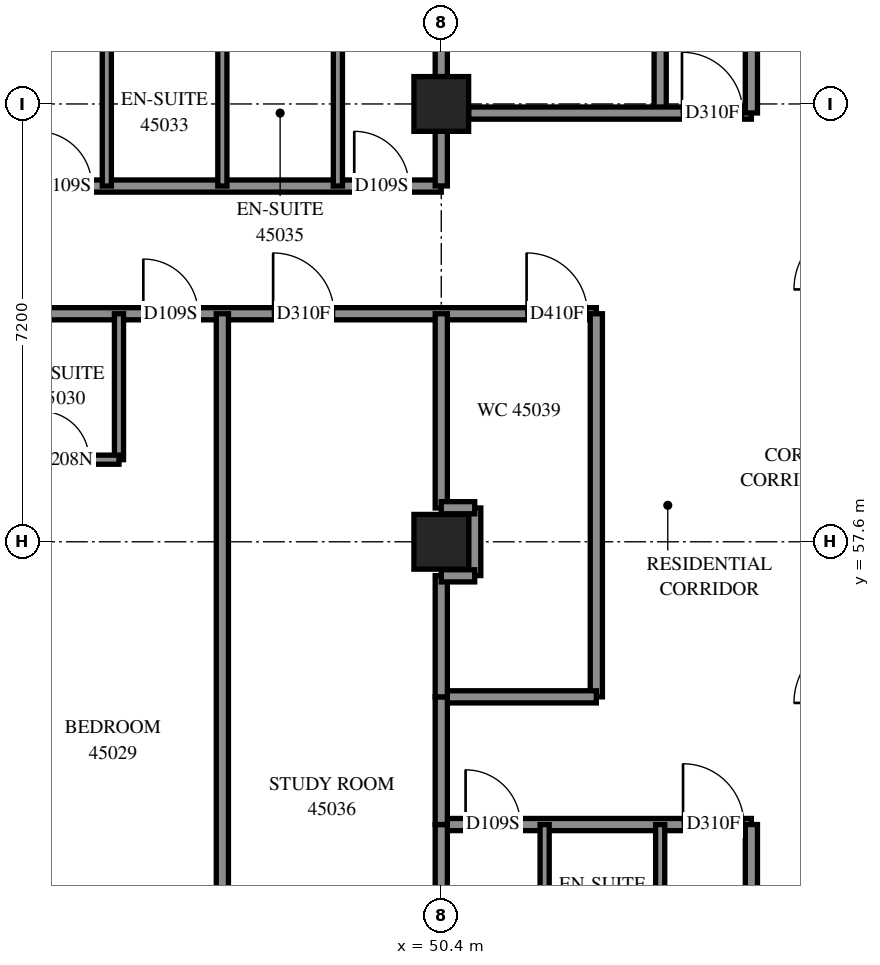
"""IFC4 building model, lengths in metres.
Left out: names, types, materials, properties, quantities, classifications, styles, units other than length and angle.
Written with IfcOpenShell. Run it as: python <this file> out.ifc"""

import sys

from ifc_helpers import new_model, si_unit, direction, frame, frame_2d, origin, origin_2d, place, context, subcontext, project, spatial, rectangle, extrude, element, fill, save


model = new_model("IFC4")
c1 = context("Model", 3, precision=1e-05, world=origin(), true_north=direction((0.0, 1.0)))
c2 = subcontext(c1, "Body", "Model", "MODEL_VIEW")
j1 = project(units=[si_unit("LENGTHUNIT", "METRE"), si_unit("PLANEANGLEUNIT", "RADIAN")], contexts=[c1])
p1 = place(None, origin())
s1 = spatial("IfcSite", under=j1, at=p1, CompositionType="ELEMENT")
p2 = place(p1, origin())
s2 = spatial("IfcBuilding", under=s1, at=p2, CompositionType="ELEMENT")
p3 = place(p2, frame((0.0, 0.0, 166.0)))
s3 = spatial("IfcBuildingStorey", under=s2, at=p3, CompositionType="ELEMENT", Elevation=166.0)
for number, where, z_axis, x_axis in (
    (1, (50.4, 57.6, 0.0), (0.0, 0.0, 1.0), (1.0, 0.0, 0.0)),
    (2, (50.4, 64.8, 0.0), (0.0, 0.0, 1.0), (1.0, 0.0, 0.0)),
):
    element("IfcColumn", number, at=place(p3, frame(where, z_axis=z_axis, x_axis=x_axis)), inside=s3, PredefinedType="COLUMN", context=c2, shape_type="SweptSolid", body=[
        extrude(rectangle(XDim=0.9, YDim=0.9, at=origin_2d()), origin(), (0.0, 0.0, 1.0), 3.1),
    ])
p4 = place(p3, frame((36.0, 61.35, 0.0), z_axis=(0.0, 0.0, 1.0), x_axis=(1.0, 0.0, 0.0)))
e3 = element("IfcWall", 3, at=p4, inside=s3, PredefinedType="PARTITIONING", context=c2, shape_type="SweptSolid", body=[
    extrude(rectangle(XDim=16.95, YDim=0.2, at=frame_2d((8.475, 0.0))), origin(), (0.0, 0.0, 1.0), 3.1),
])
p5 = place(p4, frame((2.3, 0.0, 0.0)))
e4 = element("IfcOpeningElement", 4, at=p5, cuts=e3, PredefinedType="OPENING", context=c2, shape_type="SweptSolid", body=[
    extrude(rectangle(XDim=0.9, YDim=2.1, at=frame_2d((0.45, 1.05))), frame((0.0, 0.11, 0.0), z_axis=(0.0, -1.0, 0.0), x_axis=(1.0, 0.0, 0.0)), (0.0, 0.0, 1.0), 0.22),
])
p6 = place(p4, frame((4.125, 0.0, 0.0)))
e5 = element("IfcOpeningElement", 5, at=p6, cuts=e3, PredefinedType="OPENING", context=c2, shape_type="SweptSolid", body=[
    extrude(rectangle(XDim=1.0, YDim=2.1, at=frame_2d((0.5, 1.05))), frame((0.0, 0.11, 0.0), z_axis=(0.0, -1.0, 0.0), x_axis=(1.0, 0.0, 0.0)), (0.0, 0.0, 1.0), 0.22),
])
p7 = place(p4, frame((9.5, 0.0, 0.0)))
e6 = element("IfcOpeningElement", 6, at=p7, cuts=e3, PredefinedType="OPENING", context=c2, shape_type="SweptSolid", body=[
    extrude(rectangle(XDim=0.9, YDim=2.1, at=frame_2d((0.45, 1.05))), frame((0.0, 0.11, 0.0), z_axis=(0.0, -1.0, 0.0), x_axis=(1.0, 0.0, 0.0)), (0.0, 0.0, 1.0), 0.22),
])
p8 = place(p4, frame((11.635, 0.0, 0.0)))
e7 = element("IfcOpeningElement", 7, at=p8, cuts=e3, PredefinedType="OPENING", context=c2, shape_type="SweptSolid", body=[
    extrude(rectangle(XDim=1.0, YDim=2.1, at=frame_2d((0.5, 1.05))), frame((0.0, 0.11, 0.0), z_axis=(0.0, -1.0, 0.0), x_axis=(1.0, 0.0, 0.0)), (0.0, 0.0, 1.0), 0.22),
])
p9 = place(p4, frame((15.803, 0.0, 0.0)))
e8 = element("IfcOpeningElement", 8, at=p9, cuts=e3, PredefinedType="OPENING", context=c2, shape_type="SweptSolid", body=[
    extrude(rectangle(XDim=1.0, YDim=2.1, at=frame_2d((0.5, 1.05))), frame((0.0, 0.11, 0.0), z_axis=(0.0, -1.0, 0.0), x_axis=(1.0, 0.0, 0.0)), (0.0, 0.0, 1.0), 0.22),
])
p10 = place(p3, frame((46.8, 49.7, 0.0), z_axis=(0.0, 0.0, 1.0), x_axis=(0.0, 1.0, 0.0)))
e9 = element("IfcWall", 9, at=p10, inside=s3, PredefinedType="PARTITIONING", context=c2, shape_type="SweptSolid", body=[
    extrude(rectangle(XDim=11.65, YDim=0.2, at=frame_2d((5.825, 0.0))), origin(), (0.0, 0.0, 1.0), 3.1),
])
p11 = place(p3, frame((40.65, 63.45, 0.0), z_axis=(0.0, 0.0, 1.0), x_axis=(1.0, 0.0, 0.0)))
e10 = element("IfcWall", 10, at=p11, inside=s3, PredefinedType="PARTITIONING", context=c2, shape_type="SweptSolid", body=[
    extrude(rectangle(XDim=9.75, YDim=0.2, at=frame_2d((4.875, 0.0))), origin(), (0.0, 0.0, 1.0), 3.1),
])
p12 = place(p11, frame((0.144, 0.0, 0.0)))
e11 = element("IfcOpeningElement", 11, at=p12, cuts=e10, PredefinedType="OPENING", context=c2, shape_type="SweptSolid", body=[
    extrude(rectangle(XDim=1.0, YDim=2.1, at=frame_2d((0.5, 1.05))), frame((0.0, 0.11, 0.0), z_axis=(0.0, -1.0, 0.0), x_axis=(1.0, 0.0, 0.0)), (0.0, 0.0, 1.0), 0.22),
])
p13 = place(p11, frame((3.102, 0.0, 0.0)))
e12 = element("IfcOpeningElement", 12, at=p13, cuts=e10, PredefinedType="OPENING", context=c2, shape_type="SweptSolid", body=[
    extrude(rectangle(XDim=0.9, YDim=2.1, at=frame_2d((0.45, 1.05))), frame((0.0, 0.11, 0.0), z_axis=(0.0, -1.0, 0.0), x_axis=(1.0, 0.0, 0.0)), (0.0, 0.0, 1.0), 0.22),
])
p14 = place(p11, frame((8.319, 0.0, 0.0)))
e13 = element("IfcOpeningElement", 13, at=p14, cuts=e10, PredefinedType="OPENING", context=c2, shape_type="SweptSolid", body=[
    extrude(rectangle(XDim=0.9, YDim=2.1, at=frame_2d((0.45, 1.05))), frame((0.0, 0.11, 0.0), z_axis=(0.0, -1.0, 0.0), x_axis=(1.0, 0.0, 0.0)), (0.0, 0.0, 1.0), 0.22),
])
p15 = place(p3, frame((54.0, 64.65, 0.0), z_axis=(0.0, 0.0, 1.0), x_axis=(0.0, 1.0, 0.0)))
e14 = element("IfcWall", 14, at=p15, inside=s3, PredefinedType="PARTITIONING", context=c2, shape_type="SweptSolid", body=[
    extrude(rectangle(XDim=8.117, YDim=0.2, at=frame_2d((4.059, 0.0))), origin(), (0.0, 0.0, 1.0), 3.1),
])
for number, where, z_axis, x_axis in (
    (15, (52.95, 55.05, 0.0), (0.0, 0.0, 1.0), (0.0, 1.0, 0.0)),
    (16, (50.4, 65.25, 0.0), (0.0, 0.0, 1.0), (0.0, 1.0, 0.0)),
):
    element("IfcWall", number, at=place(p3, frame(where, z_axis=z_axis, x_axis=x_axis)), inside=s3, PredefinedType="PARTITIONING", context=c2, shape_type="SweptSolid", body=[
        extrude(rectangle(XDim=6.3, YDim=0.2, at=frame_2d((3.15, 0.0))), origin(), (0.0, 0.0, 1.0), 3.1),
    ])
p16 = place(p3, frame((50.4, 52.95, 0.0), z_axis=(0.0, 0.0, 1.0), x_axis=(1.0, 0.0, 0.0)))
e17 = element("IfcWall", 17, at=p16, inside=s3, PredefinedType="PARTITIONING", context=c2, shape_type="SweptSolid", body=[
    extrude(rectangle(XDim=5.1, YDim=0.2, at=frame_2d((2.55, 0.0))), origin(), (0.0, 0.0, 1.0), 3.1),
])
p17 = place(p16, frame((0.4, 0.0, 0.0)))
e18 = element("IfcOpeningElement", 18, at=p17, cuts=e17, PredefinedType="OPENING", context=c2, shape_type="SweptSolid", body=[
    extrude(rectangle(XDim=0.9, YDim=2.1, at=frame_2d((0.45, 1.05))), frame((0.0, 0.11, 0.0), z_axis=(0.0, -1.0, 0.0), x_axis=(1.0, 0.0, 0.0)), (0.0, 0.0, 1.0), 0.22),
])
p18 = place(p16, frame((3.976, 0.0, 0.0)))
e19 = element("IfcOpeningElement", 19, at=p18, cuts=e17, PredefinedType="OPENING", context=c2, shape_type="SweptSolid", body=[
    extrude(rectangle(XDim=1.0, YDim=2.1, at=frame_2d((0.5, 1.05))), frame((0.0, 0.11, 0.0), z_axis=(0.0, -1.0, 0.0), x_axis=(1.0, 0.0, 0.0)), (0.0, 0.0, 1.0), 0.22),
])
p19 = place(p3, frame((55.5, 48.3, 0.0), z_axis=(0.0, 0.0, 1.0), x_axis=(0.0, 1.0, 0.0)))
e20 = element("IfcWall", 20, at=p19, inside=s3, PredefinedType="PARTITIONING", context=c2, shape_type="SweptSolid", body=[
    extrude(rectangle(XDim=4.65, YDim=0.2, at=frame_2d((2.325, 0.0))), origin(), (0.0, 0.0, 1.0), 3.1),
])
p20 = place(p3, frame((50.85, 64.65, 0.0), z_axis=(0.0, 0.0, 1.0), x_axis=(1.0, 0.0, 0.0)))
e21 = element("IfcWall", 21, at=p20, inside=s3, PredefinedType="PARTITIONING", context=c2, shape_type="SweptSolid", body=[
    extrude(rectangle(XDim=4.65, YDim=0.2, at=frame_2d((2.325, 0.0))), origin(), (0.0, 0.0, 1.0), 3.1),
])
p21 = place(p20, frame((3.509, 0.0, 0.0)))
e22 = element("IfcOpeningElement", 22, at=p21, cuts=e21, PredefinedType="OPENING", context=c2, shape_type="SweptSolid", body=[
    extrude(rectangle(XDim=1.0, YDim=2.1, at=frame_2d((0.5, 1.05))), frame((0.0, 0.11, 0.0), z_axis=(0.0, -1.0, 0.0), x_axis=(1.0, 0.0, 0.0)), (0.0, 0.0, 1.0), 0.22),
])
p22 = place(p3, frame((50.4, 58.156, 0.0), z_axis=(0.0, 0.0, 1.0), x_axis=(0.0, 1.0, 0.0)))
e23 = element("IfcWall", 23, at=p22, inside=s3, PredefinedType="PARTITIONING", context=c2, shape_type="SweptSolid", body=[
    extrude(rectangle(XDim=3.194, YDim=0.2, at=frame_2d((1.597, 0.0))), origin(), (0.0, 0.0, 1.0), 3.1),
])
p23 = place(p3, frame((50.4, 55.05, 0.0), z_axis=(0.0, 0.0, 1.0), x_axis=(1.0, 0.0, 0.0)))
e24 = element("IfcWall", 24, at=p23, inside=s3, PredefinedType="PARTITIONING", context=c2, shape_type="SweptSolid", body=[
    extrude(rectangle(XDim=2.55, YDim=0.2, at=frame_2d((1.275, 0.0))), origin(), (0.0, 0.0, 1.0), 3.1),
])
for number, where, z_axis, x_axis in (
    (25, (52.1, 50.55, 0.0), (0.0, 0.0, 1.0), (0.0, 1.0, 0.0)),
    (26, (54.0, 50.55, 0.0), (0.0, 0.0, 1.0), (0.0, 1.0, 0.0)),
    (27, (45.1, 58.95, 0.0), (0.0, 0.0, 1.0), (0.0, 1.0, 0.0)),
    (28, (44.9, 63.45, 0.0), (0.0, 0.0, 1.0), (0.0, 1.0, 0.0)),
    (29, (46.8, 63.45, 0.0), (0.0, 0.0, 1.0), (0.0, 1.0, 0.0)),
    (30, (48.7, 63.45, 0.0), (0.0, 0.0, 1.0), (0.0, 1.0, 0.0)),
):
    element("IfcWall", number, at=place(p3, frame(where, z_axis=z_axis, x_axis=x_axis)), inside=s3, PredefinedType="PARTITIONING", context=c2, shape_type="SweptSolid", body=[
        extrude(rectangle(XDim=2.4, YDim=0.15, at=frame_2d((1.2, 0.0))), origin(), (0.0, 0.0, 1.0), 3.1),
    ])
p24 = place(p3, frame((55.5, 64.652, 0.0), z_axis=(0.0, 0.0, 1.0), x_axis=(0.0, 1.0, 0.0)))
e31 = element("IfcWall", 31, at=p24, inside=s3, PredefinedType="PARTITIONING", context=c2, shape_type="SweptSolid", body=[
    extrude(rectangle(XDim=2.248, YDim=0.2, at=frame_2d((1.124, 0.0))), origin(), (0.0, 0.0, 1.0), 3.1),
])
for number, where, z_axis, x_axis in (
    (32, (50.4, 50.85, 0.0), (0.0, 0.0, 1.0), (0.0, 1.0, 0.0)),
    (33, (50.4, 52.95, 0.0), (0.0, 0.0, 1.0), (0.0, 1.0, 0.0)),
):
    element("IfcWall", number, at=place(p3, frame(where, z_axis=z_axis, x_axis=x_axis)), inside=s3, PredefinedType="PARTITIONING", context=c2, shape_type="SweptSolid", body=[
        extrude(rectangle(XDim=2.1, YDim=0.2, at=frame_2d((1.05, 0.0))), origin(), (0.0, 0.0, 1.0), 3.1),
    ])
p25 = place(p3, frame((50.4, 55.05, 0.0), z_axis=(0.0, 0.0, 1.0), x_axis=(0.0, 1.0, 0.0)))
e34 = element("IfcWall", 34, at=p25, inside=s3, PredefinedType="PARTITIONING", context=c2, shape_type="SweptSolid", body=[
    extrude(rectangle(XDim=1.994, YDim=0.2, at=frame_2d((0.997, 0.0))), origin(), (0.0, 0.0, 1.0), 3.1),
])
p26 = place(p3, frame((43.2, 58.95, 0.0), z_axis=(0.0, 0.0, 1.0), x_axis=(1.0, 0.0, 0.0)))
e35 = element("IfcWall", 35, at=p26, inside=s3, PredefinedType="PARTITIONING", context=c2, shape_type="SweptSolid", body=[
    extrude(rectangle(XDim=1.9, YDim=0.15, at=frame_2d((0.95, 0.0))), origin(), (0.0, 0.0, 1.0), 3.1),
])
p27 = place(p26, frame((0.607, 0.0, 0.0)))
e36 = element("IfcOpeningElement", 36, at=p27, cuts=e35, PredefinedType="OPENING", context=c2, shape_type="SweptSolid", body=[
    extrude(rectangle(XDim=0.8, YDim=2.1, at=frame_2d((0.4, 1.05))), frame((0.0, 0.085, 0.0), z_axis=(0.0, -1.0, 0.0), x_axis=(1.0, 0.0, 0.0)), (0.0, 0.0, 1.0), 0.17),
])
p28 = place(p3, frame((50.95, 57.044, 0.0), z_axis=(0.0, 0.0, 1.0), x_axis=(0.0, 1.0, 0.0)))
e37 = element("IfcWall", 37, at=p28, inside=s3, PredefinedType="PARTITIONING", context=c2, shape_type="SweptSolid", body=[
    extrude(rectangle(XDim=1.112, YDim=0.2, at=frame_2d((0.556, 0.0))), origin(), (0.0, 0.0, 1.0), 3.1),
])
p29 = place(p3, frame((50.4, 63.452, 0.0), z_axis=(0.0, 0.0, 1.0), x_axis=(0.0, 1.0, 0.0)))
e38 = element("IfcWall", 38, at=p29, inside=s3, PredefinedType="PARTITIONING", context=c2, shape_type="SweptSolid", body=[
    extrude(rectangle(XDim=0.898, YDim=0.2, at=frame_2d((0.449, 0.0))), origin(), (0.0, 0.0, 1.0), 3.1),
])
for number, where, z_axis, x_axis in (
    (39, (50.4, 58.16, 0.0), (0.0, 0.0, 1.0), (1.0, 0.0, 0.0)),
    (40, (50.4, 57.04, 0.0), (0.0, 0.0, 1.0), (1.0, 0.0, 0.0)),
):
    element("IfcWall", number, at=place(p3, frame(where, z_axis=z_axis, x_axis=x_axis)), inside=s3, PredefinedType="PARTITIONING", context=c2, shape_type="SweptSolid", body=[
        extrude(rectangle(XDim=0.55, YDim=0.2, at=frame_2d((0.275, 0.0))), origin(), (0.0, 0.0, 1.0), 3.1),
    ])
p30 = place(p7, origin())
e41 = element("IfcDoor", 41, at=p30, inside=s3, OperationType="SINGLE_SWING_LEFT", PredefinedType="DOOR", context=c2, shape_type="SweptSolid", body=[
    extrude(rectangle(XDim=0.9, YDim=2.1, at=frame_2d((0.45, 1.05))), frame((0.0, 0.025, 0.0), z_axis=(0.0, -1.0, 0.0), x_axis=(1.0, 0.0, 0.0)), (0.0, 0.0, 1.0), 0.05),
])
fill(e6, e41)
p31 = place(p27, origin())
e42 = element("IfcDoor", 42, at=p31, inside=s3, OperationType="SINGLE_SWING_RIGHT", PredefinedType="DOOR", context=c2, shape_type="SweptSolid", body=[
    extrude(rectangle(XDim=0.8, YDim=2.1, at=frame_2d((0.4, 1.05))), frame((0.0, 0.025, 0.0), z_axis=(0.0, -1.0, 0.0), x_axis=(1.0, 0.0, 0.0)), (0.0, 0.0, 1.0), 0.05),
])
fill(e36, e42)
p32 = place(p13, origin())
e43 = element("IfcDoor", 43, at=p32, inside=s3, OperationType="SINGLE_SWING_RIGHT", PredefinedType="DOOR", context=c2, shape_type="SweptSolid", body=[
    extrude(rectangle(XDim=0.9, YDim=2.1, at=frame_2d((0.45, 1.05))), frame((0.0, 0.025, 0.0), z_axis=(0.0, -1.0, 0.0), x_axis=(1.0, 0.0, 0.0)), (0.0, 0.0, 1.0), 0.05),
])
fill(e12, e43)
p33 = place(p14, origin())
e44 = element("IfcDoor", 44, at=p33, inside=s3, OperationType="SINGLE_SWING_LEFT", PredefinedType="DOOR", context=c2, shape_type="SweptSolid", body=[
    extrude(rectangle(XDim=0.9, YDim=2.1, at=frame_2d((0.45, 1.05))), frame((0.0, 0.025, 0.0), z_axis=(0.0, -1.0, 0.0), x_axis=(1.0, 0.0, 0.0)), (0.0, 0.0, 1.0), 0.05),
])
fill(e13, e44)
p34 = place(p8, origin())
e45 = element("IfcDoor", 45, at=p34, inside=s3, OperationType="SINGLE_SWING_RIGHT", PredefinedType="DOOR", context=c2, shape_type="SweptSolid", body=[
    extrude(rectangle(XDim=1.0, YDim=2.1, at=frame_2d((0.5, 1.05))), frame((0.0, 0.025, 0.0), z_axis=(0.0, -1.0, 0.0), x_axis=(1.0, 0.0, 0.0)), (0.0, 0.0, 1.0), 0.05),
])
fill(e7, e45)
p35 = place(p21, origin())
e46 = element("IfcDoor", 46, at=p35, inside=s3, OperationType="SINGLE_SWING_LEFT", PredefinedType="DOOR", context=c2, shape_type="SweptSolid", body=[
    extrude(rectangle(XDim=1.0, YDim=2.1, at=frame_2d((0.5, 1.05))), frame((0.0, 0.025, 0.0), z_axis=(0.0, -1.0, 0.0), x_axis=(1.0, 0.0, 0.0)), (0.0, 0.0, 1.0), 0.05),
])
fill(e22, e46)
p36 = place(p9, origin())
e47 = element("IfcDoor", 47, at=p36, inside=s3, OperationType="SINGLE_SWING_LEFT", PredefinedType="DOOR", context=c2, shape_type="SweptSolid", body=[
    extrude(rectangle(XDim=1.0, YDim=2.1, at=frame_2d((0.5, 1.05))), frame((0.0, 0.025, 0.0), z_axis=(0.0, -1.0, 0.0), x_axis=(1.0, 0.0, 0.0)), (0.0, 0.0, 1.0), 0.05),
])
fill(e8, e47)
p37 = place(p17, origin())
e48 = element("IfcDoor", 48, at=p37, inside=s3, OperationType="SINGLE_SWING_LEFT", PredefinedType="DOOR", context=c2, shape_type="SweptSolid", body=[
    extrude(rectangle(XDim=0.9, YDim=2.1, at=frame_2d((0.45, 1.05))), frame((0.0, 0.025, 0.0), z_axis=(0.0, -1.0, 0.0), x_axis=(1.0, 0.0, 0.0)), (0.0, 0.0, 1.0), 0.05),
])
fill(e18, e48)
p38 = place(p18, origin())
e49 = element("IfcDoor", 49, at=p38, inside=s3, OperationType="SINGLE_SWING_RIGHT", PredefinedType="DOOR", context=c2, shape_type="SweptSolid", body=[
    extrude(rectangle(XDim=1.0, YDim=2.1, at=frame_2d((0.5, 1.05))), frame((0.0, 0.025, 0.0), z_axis=(0.0, -1.0, 0.0), x_axis=(1.0, 0.0, 0.0)), (0.0, 0.0, 1.0), 0.05),
])
fill(e19, e49)
save(model, sys.argv[1])
